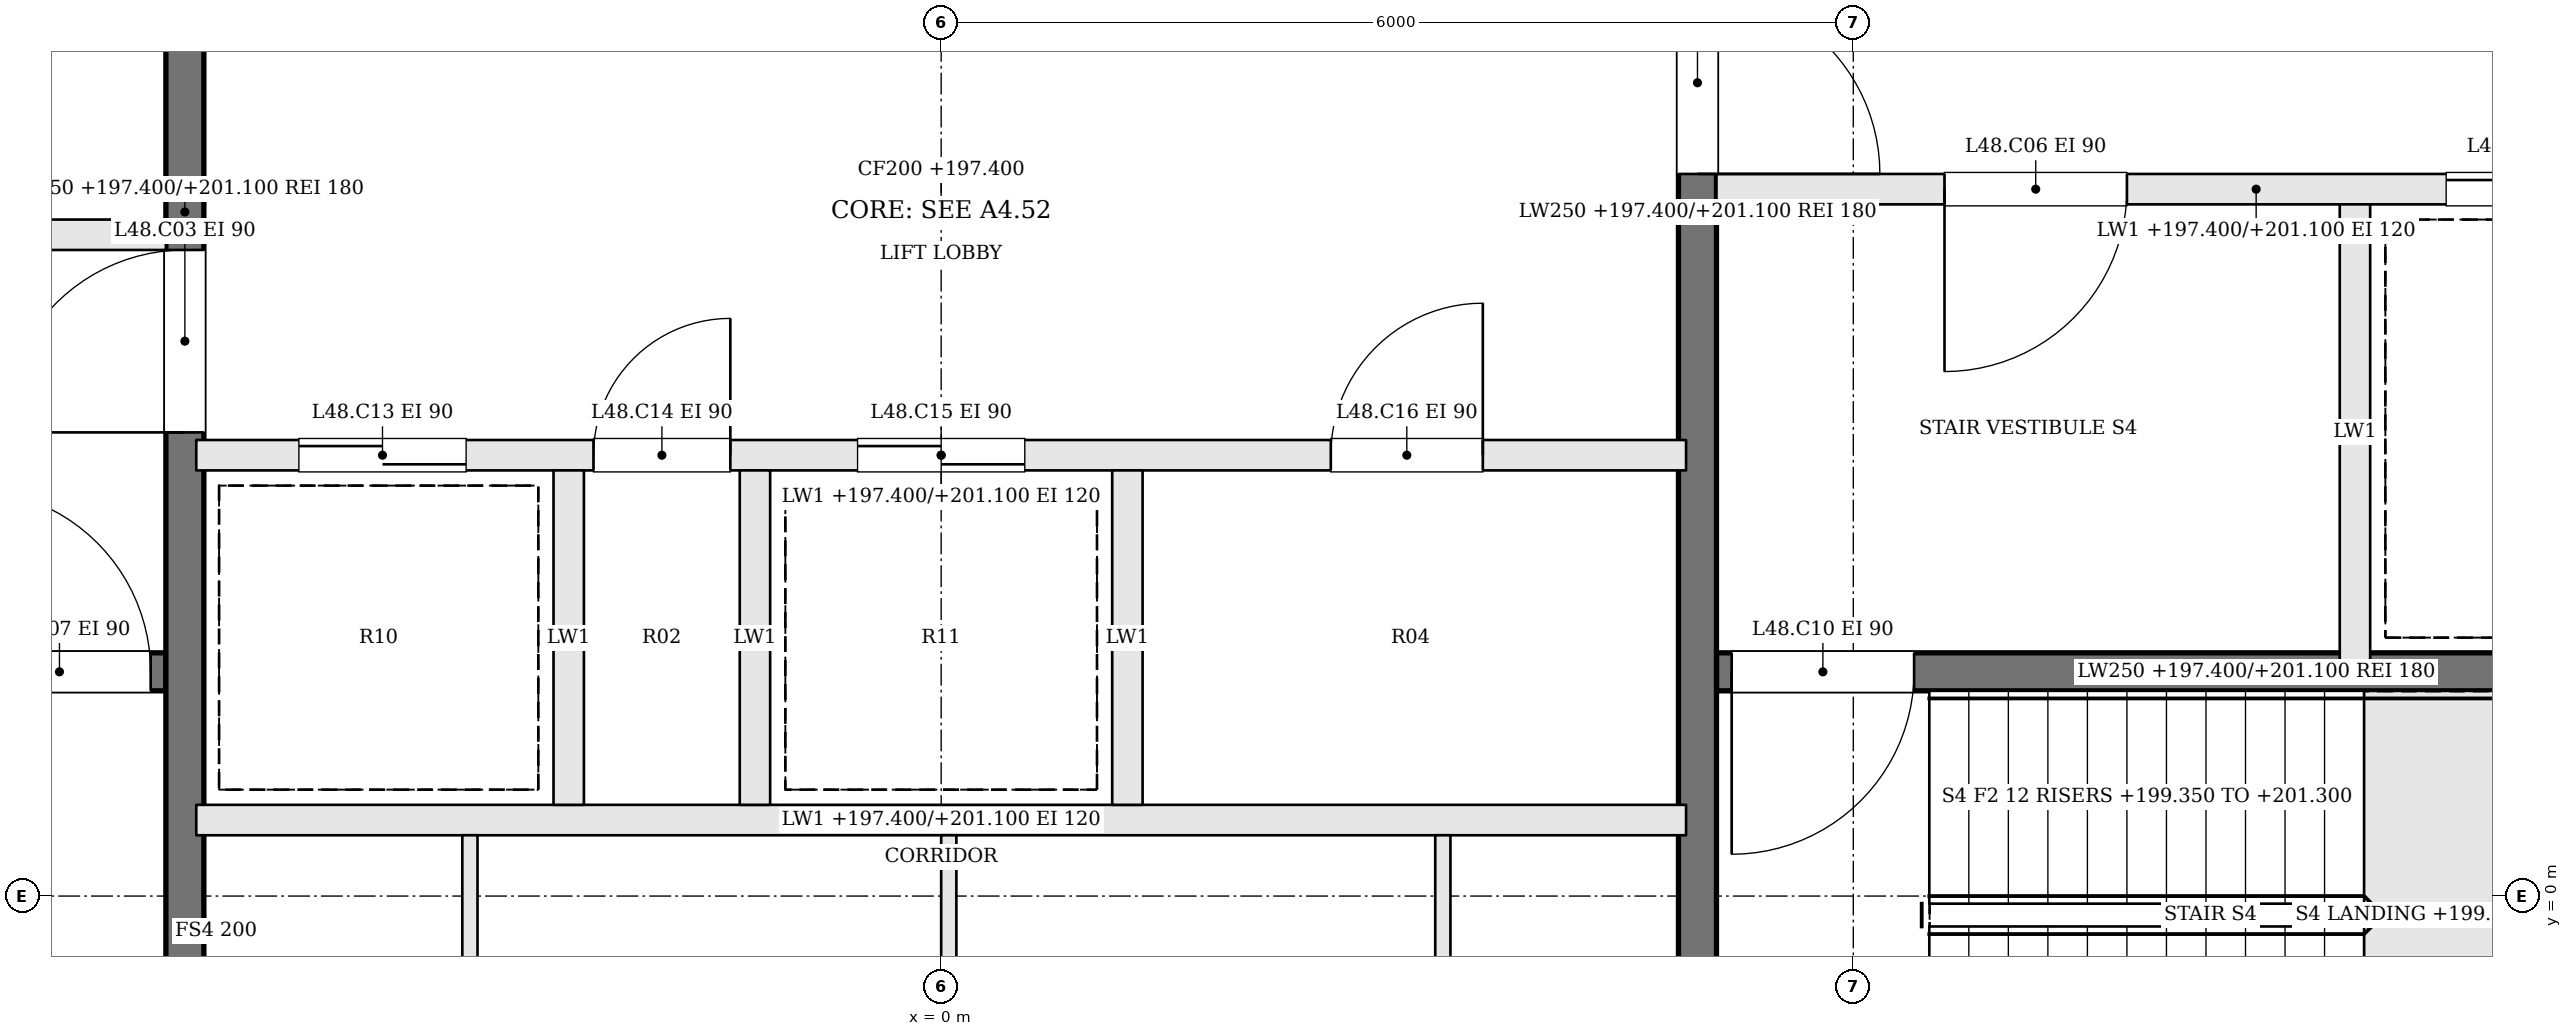
"""IFC4 building model, lengths in metres.
Left out: names, types, materials, properties, quantities, classifications, styles, units other than length and angle.
Written with IfcOpenShell. Run it as: python <this file> out.ifc"""

import sys

from ifc_helpers import new_model, si_unit, direction, frame, frame_2d, origin, place, context, subcontext, project, spatial, rectangle, extrude, element, fill, save


model = new_model("IFC4")
c1 = context("Model", 3, precision=1e-05, world=origin(), true_north=direction((0.0, 1.0)))
c2 = subcontext(c1, "Body", "Model", "MODEL_VIEW")
j1 = project(units=[si_unit("LENGTHUNIT", "METRE"), si_unit("PLANEANGLEUNIT", "RADIAN")], contexts=[c1])
p1 = place(None, origin())
s1 = spatial("IfcSite", under=j1, at=p1, CompositionType="ELEMENT")
p2 = place(p1, origin())
s2 = spatial("IfcBuilding", under=s1, at=p2, CompositionType="ELEMENT")
p3 = place(p2, frame((0.0, 0.0, 197.4)))
s3 = spatial("IfcBuildingStorey", under=s2, at=p3, CompositionType="ELEMENT", Elevation=197.4)
p4 = place(p3, frame((-12.2, 1.475, 0.0), z_axis=(0.0, 0.0, 1.0), x_axis=(1.0, 0.0, 0.0)))
e1 = element("IfcWall", 1, at=p4, inside=s3, PredefinedType="SOLIDWALL", context=c2, shape_type="SweptSolid", body=[
    extrude(rectangle(XDim=7.1, YDim=0.25, at=frame_2d((3.55, 0.0))), origin(), (0.0, 0.0, 1.0), 3.7),
])
p5 = place(p4, frame((5.8, 0.0, 0.0)))
e2 = element("IfcOpeningElement", 2, at=p5, cuts=e1, PredefinedType="OPENING", context=c2, shape_type="SweptSolid", body=[
    extrude(rectangle(XDim=1.2, YDim=2.1, at=frame_2d((0.6, 1.05))), frame((0.0, 0.135, 0.0), z_axis=(0.0, -1.0, 0.0), x_axis=(1.0, 0.0, 0.0)), (0.0, 0.0, 1.0), 0.27),
])
p6 = place(p3, frame((-12.2, 4.35, 0.0), z_axis=(0.0, 0.0, 1.0), x_axis=(1.0, 0.0, 0.0)))
e3 = element("IfcWall", 3, at=p6, inside=s3, PredefinedType="SOLIDWALL", context=c2, shape_type="SweptSolid", body=[
    extrude(rectangle(XDim=7.1, YDim=0.2, at=frame_2d((3.55, 0.0))), origin(), (0.0, 0.0, 1.0), 3.7),
])
p7 = place(p6, frame((4.4, 0.0, 0.0)))
e4 = element("IfcOpeningElement", 4, at=p7, cuts=e3, PredefinedType="OPENING", context=c2, shape_type="SweptSolid", body=[
    extrude(rectangle(XDim=1.2, YDim=2.1, at=frame_2d((0.6, 1.05))), frame((0.0, 0.11, 0.0), z_axis=(0.0, -1.0, 0.0), x_axis=(1.0, 0.0, 0.0)), (0.0, 0.0, 1.0), 0.22),
])
p8 = place(p6, frame((1.1, 0.0, 0.0)))
e5 = element("IfcOpeningElement", 5, at=p8, cuts=e3, PredefinedType="OPENING", context=c2, shape_type="SweptSolid", body=[
    extrude(rectangle(XDim=1.2, YDim=2.1, at=frame_2d((0.6, 1.05))), frame((0.0, 0.11, 0.0), z_axis=(0.0, -1.0, 0.0), x_axis=(1.0, 0.0, 0.0)), (0.0, 0.0, 1.0), 0.22),
])
p9 = place(p3, frame((12.2, 4.65, 0.0), z_axis=(0.0, 0.0, 1.0), x_axis=(-1.0, 0.0, 0.0)))
e6 = element("IfcWall", 6, at=p9, inside=s3, PredefinedType="SOLIDWALL", context=c2, shape_type="SweptSolid", body=[
    extrude(rectangle(XDim=7.1, YDim=0.2, at=frame_2d((3.55, 0.0))), origin(), (0.0, 0.0, 1.0), 3.7),
])
p10 = place(p9, frame((4.4, 0.0, 0.0)))
e7 = element("IfcOpeningElement", 7, at=p10, cuts=e6, PredefinedType="OPENING", context=c2, shape_type="SweptSolid", body=[
    extrude(rectangle(XDim=1.2, YDim=2.1, at=frame_2d((0.6, 1.05))), frame((0.0, 0.11, 0.0), z_axis=(0.0, -1.0, 0.0), x_axis=(1.0, 0.0, 0.0)), (0.0, 0.0, 1.0), 0.22),
])
p11 = place(p9, frame((1.1, 0.0, 0.0)))
e8 = element("IfcOpeningElement", 8, at=p11, cuts=e6, PredefinedType="OPENING", context=c2, shape_type="SweptSolid", body=[
    extrude(rectangle(XDim=1.2, YDim=2.1, at=frame_2d((0.6, 1.05))), frame((0.0, 0.11, 0.0), z_axis=(0.0, -1.0, 0.0), x_axis=(1.0, 0.0, 0.0)), (0.0, 0.0, 1.0), 0.22),
])
p12 = place(p3, frame((12.2, 1.475, 0.0), z_axis=(0.0, 0.0, 1.0), x_axis=(-1.0, 0.0, 0.0)))
e9 = element("IfcWall", 9, at=p12, inside=s3, PredefinedType="SOLIDWALL", context=c2, shape_type="SweptSolid", body=[
    extrude(rectangle(XDim=7.1, YDim=0.25, at=frame_2d((3.55, 0.0))), origin(), (0.0, 0.0, 1.0), 3.7),
])
p13 = place(p12, frame((5.8, 0.0, 0.0)))
e10 = element("IfcOpeningElement", 10, at=p13, cuts=e9, PredefinedType="OPENING", context=c2, shape_type="SweptSolid", body=[
    extrude(rectangle(XDim=1.2, YDim=2.1, at=frame_2d((0.6, 1.05))), frame((0.0, 0.135, 0.0), z_axis=(0.0, -1.0, 0.0), x_axis=(1.0, 0.0, 0.0)), (0.0, 0.0, 1.0), 0.27),
])
p14 = place(p3, frame((9.3, 4.55, 0.0), z_axis=(0.0, 0.0, 1.0), x_axis=(0.0, -1.0, 0.0)))
e11 = element("IfcWall", 11, at=p14, inside=s3, PredefinedType="SOLIDWALL", context=c2, shape_type="SweptSolid", body=[
    extrude(rectangle(XDim=3.0, YDim=0.2, at=frame_2d((1.5, 0.0))), origin(), (0.0, 0.0, 1.0), 3.7),
])
p15 = place(p3, frame((-4.975, -2.2, 0.0), z_axis=(0.0, 0.0, 1.0), x_axis=(0.0, 1.0, 0.0)))
e12 = element("IfcWall", 12, at=p15, inside=s3, PredefinedType="SOLIDWALL", context=c2, shape_type="SweptSolid", body=[
    extrude(rectangle(XDim=13.4, YDim=0.25, at=frame_2d((6.7, 0.0))), origin(), (0.0, 0.0, 1.0), 3.7),
])
p16 = place(p15, frame((5.25, 0.0, 0.0)))
e13 = element("IfcOpeningElement", 13, at=p16, cuts=e12, PredefinedType="OPENING", context=c2, shape_type="SweptSolid", body=[
    extrude(rectangle(XDim=1.2, YDim=2.1, at=frame_2d((0.6, 1.05))), frame((0.0, 0.135, 0.0), z_axis=(0.0, -1.0, 0.0), x_axis=(1.0, 0.0, 0.0)), (0.0, 0.0, 1.0), 0.27),
])
p17 = place(p3, frame((4.975, 11.2, 0.0), z_axis=(0.0, 0.0, 1.0), x_axis=(0.0, -1.0, 0.0)))
e14 = element("IfcWall", 14, at=p17, inside=s3, PredefinedType="SOLIDWALL", context=c2, shape_type="SweptSolid", body=[
    extrude(rectangle(XDim=13.4, YDim=0.25, at=frame_2d((6.7, 0.0))), origin(), (0.0, 0.0, 1.0), 3.7),
])
p18 = place(p17, frame((5.25, 0.0, 0.0)))
e15 = element("IfcOpeningElement", 15, at=p18, cuts=e14, PredefinedType="OPENING", context=c2, shape_type="SweptSolid", body=[
    extrude(rectangle(XDim=1.2, YDim=2.1, at=frame_2d((0.6, 1.05))), frame((0.0, 0.135, 0.0), z_axis=(0.0, -1.0, 0.0), x_axis=(1.0, 0.0, 0.0)), (0.0, 0.0, 1.0), 0.27),
])
p19 = place(p3, frame((-4.9, 0.5, 0.0), z_axis=(0.0, 0.0, 1.0), x_axis=(1.0, 0.0, 0.0)))
e16 = element("IfcWall", 16, at=p19, inside=s3, PredefinedType="SOLIDWALL", context=c2, shape_type="SweptSolid", body=[
    extrude(rectangle(XDim=9.8, YDim=0.2, at=frame_2d((4.9, 0.0))), origin(), (0.0, 0.0, 1.0), 3.7),
])
p20 = place(p3, frame((-4.9, 2.9, 0.0), z_axis=(0.0, 0.0, 1.0), x_axis=(1.0, 0.0, 0.0)))
e17 = element("IfcWall", 17, at=p20, inside=s3, PredefinedType="SOLIDWALL", context=c2, shape_type="SweptSolid", body=[
    extrude(rectangle(XDim=9.8, YDim=0.2, at=frame_2d((4.9, 0.0))), origin(), (0.0, 0.0, 1.0), 3.7),
])
p21 = place(p20, frame((0.675, 0.0, 0.0)))
e18 = element("IfcOpeningElement", 18, at=p21, cuts=e17, PredefinedType="OPENING", context=c2, shape_type="SweptSolid", body=[
    extrude(rectangle(XDim=1.1, YDim=2.1, at=frame_2d((0.55, 1.05))), frame((0.0, 0.11, 0.0), z_axis=(0.0, -1.0, 0.0), x_axis=(1.0, 0.0, 0.0)), (0.0, 0.0, 1.0), 0.22),
])
p22 = place(p20, frame((2.613, 0.0, 0.0)))
e19 = element("IfcOpeningElement", 19, at=p22, cuts=e17, PredefinedType="OPENING", context=c2, shape_type="SweptSolid", body=[
    extrude(rectangle(XDim=0.9, YDim=2.1, at=frame_2d((0.45, 1.05))), frame((0.0, 0.11, 0.0), z_axis=(0.0, -1.0, 0.0), x_axis=(1.0, 0.0, 0.0)), (0.0, 0.0, 1.0), 0.22),
])
p23 = place(p20, frame((4.35, 0.0, 0.0)))
e20 = element("IfcOpeningElement", 20, at=p23, cuts=e17, PredefinedType="OPENING", context=c2, shape_type="SweptSolid", body=[
    extrude(rectangle(XDim=1.1, YDim=2.1, at=frame_2d((0.55, 1.05))), frame((0.0, 0.11, 0.0), z_axis=(0.0, -1.0, 0.0), x_axis=(1.0, 0.0, 0.0)), (0.0, 0.0, 1.0), 0.22),
])
p24 = place(p20, frame((7.463, 0.0, 0.0)))
e21 = element("IfcOpeningElement", 21, at=p24, cuts=e17, PredefinedType="OPENING", context=c2, shape_type="SweptSolid", body=[
    extrude(rectangle(XDim=1.0, YDim=2.1, at=frame_2d((0.5, 1.05))), frame((0.0, 0.11, 0.0), z_axis=(0.0, -1.0, 0.0), x_axis=(1.0, 0.0, 0.0)), (0.0, 0.0, 1.0), 0.22),
])
for number, where, z_axis, x_axis in (
    (22, (-2.45, 0.6, 0.0), (0.0, 0.0, 1.0), (0.0, 1.0, 0.0)),
    (23, (-1.225, 0.6, 0.0), (0.0, 0.0, 1.0), (0.0, 1.0, 0.0)),
    (24, (1.225, 0.6, 0.0), (0.0, 0.0, 1.0), (0.0, 1.0, 0.0)),
):
    element("IfcWall", number, at=place(p3, frame(where, z_axis=z_axis, x_axis=x_axis)), inside=s3, PredefinedType="SOLIDWALL", context=c2, shape_type="SweptSolid", body=[
        extrude(rectangle(XDim=2.2, YDim=0.2, at=frame_2d((1.1, 0.0))), origin(), (0.0, 0.0, 1.0), 3.7),
    ])
for number, where, z_axis, x_axis in (
    (25, (-3.1, -2.2, 0.0), (0.0, 0.0, 1.0), (0.0, 1.0, 0.0)),
    (26, (0.05, -2.2, 0.0), (0.0, 0.0, 1.0), (0.0, 1.0, 0.0)),
    (27, (3.3, -2.2, 0.0), (0.0, 0.0, 1.0), (0.0, 1.0, 0.0)),
):
    element("IfcWall", number, at=place(p3, frame(where, z_axis=z_axis, x_axis=x_axis)), inside=s3, PredefinedType="PARTITIONING", context=c2, shape_type="SweptSolid", body=[
        extrude(rectangle(XDim=2.6, YDim=0.1, at=frame_2d((1.3, 0.0))), origin(), (0.0, 0.0, 1.0), 3.7),
    ])
p25 = place(p16, origin())
e28 = element("IfcDoor", 28, at=p25, inside=s3, OperationType="SINGLE_SWING_LEFT", PredefinedType="DOOR", context=c2, shape_type="SweptSolid", body=[
    extrude(rectangle(XDim=1.2, YDim=2.1, at=frame_2d((0.6, 1.05))), frame((0.0, 0.025, 0.0), z_axis=(0.0, -1.0, 0.0), x_axis=(1.0, 0.0, 0.0)), (0.0, 0.0, 1.0), 0.05),
])
fill(e13, e28)
p26 = place(p18, origin())
e29 = element("IfcDoor", 29, at=p26, inside=s3, OperationType="SINGLE_SWING_RIGHT", PredefinedType="DOOR", context=c2, shape_type="SweptSolid", body=[
    extrude(rectangle(XDim=1.2, YDim=2.1, at=frame_2d((0.6, 1.05))), frame((0.0, 0.025, 0.0), z_axis=(0.0, -1.0, 0.0), x_axis=(1.0, 0.0, 0.0)), (0.0, 0.0, 1.0), 0.05),
])
fill(e15, e29)
p27 = place(p10, origin())
e30 = element("IfcDoor", 30, at=p27, inside=s3, OperationType="SINGLE_SWING_RIGHT", PredefinedType="DOOR", context=c2, shape_type="SweptSolid", body=[
    extrude(rectangle(XDim=1.2, YDim=2.1, at=frame_2d((0.6, 1.05))), frame((0.0, 0.025, 0.0), z_axis=(0.0, -1.0, 0.0), x_axis=(1.0, 0.0, 0.0)), (0.0, 0.0, 1.0), 0.05),
])
fill(e7, e30)
p28 = place(p5, origin())
e31 = element("IfcDoor", 31, at=p28, inside=s3, OperationType="SINGLE_SWING_LEFT", PredefinedType="DOOR", context=c2, shape_type="SweptSolid", body=[
    extrude(rectangle(XDim=1.2, YDim=2.1, at=frame_2d((0.6, 1.05))), frame((0.0, 0.025, 0.0), z_axis=(0.0, -1.0, 0.0), x_axis=(1.0, 0.0, 0.0)), (0.0, 0.0, 1.0), 0.05),
])
fill(e2, e31)
p29 = place(p13, origin())
e32 = element("IfcDoor", 32, at=p29, inside=s3, OperationType="SINGLE_SWING_RIGHT", PredefinedType="DOOR", context=c2, shape_type="SweptSolid", body=[
    extrude(rectangle(XDim=1.2, YDim=2.1, at=frame_2d((0.6, 1.05))), frame((0.0, 0.025, 0.0), z_axis=(0.0, -1.0, 0.0), x_axis=(1.0, 0.0, 0.0)), (0.0, 0.0, 1.0), 0.05),
])
fill(e10, e32)
p30 = place(p11, origin())
e33 = element("IfcDoor", 33, at=p30, inside=s3, OperationType="SLIDING_TO_RIGHT", PredefinedType="DOOR", context=c2, shape_type="SweptSolid", body=[
    extrude(rectangle(XDim=1.2, YDim=2.1, at=frame_2d((0.6, 1.05))), frame((0.0, 0.025, 0.0), z_axis=(0.0, -1.0, 0.0), x_axis=(1.0, 0.0, 0.0)), (0.0, 0.0, 1.0), 0.05),
])
fill(e8, e33)
p31 = place(p21, origin())
e34 = element("IfcDoor", 34, at=p31, inside=s3, OperationType="SLIDING_TO_RIGHT", PredefinedType="DOOR", context=c2, shape_type="SweptSolid", body=[
    extrude(rectangle(XDim=1.1, YDim=2.1, at=frame_2d((0.55, 1.05))), frame((0.0, 0.025, 0.0), z_axis=(0.0, -1.0, 0.0), x_axis=(1.0, 0.0, 0.0)), (0.0, 0.0, 1.0), 0.05),
])
fill(e18, e34)
p32 = place(p22, origin())
e35 = element("IfcDoor", 35, at=p32, inside=s3, OperationType="SINGLE_SWING_RIGHT", PredefinedType="DOOR", context=c2, shape_type="SweptSolid", body=[
    extrude(rectangle(XDim=0.9, YDim=2.1, at=frame_2d((0.45, 1.05))), frame((0.0, 0.025, 0.0), z_axis=(0.0, -1.0, 0.0), x_axis=(1.0, 0.0, 0.0)), (0.0, 0.0, 1.0), 0.05),
])
fill(e19, e35)
p33 = place(p23, origin())
e36 = element("IfcDoor", 36, at=p33, inside=s3, OperationType="SLIDING_TO_LEFT", PredefinedType="DOOR", context=c2, shape_type="SweptSolid", body=[
    extrude(rectangle(XDim=1.1, YDim=2.1, at=frame_2d((0.55, 1.05))), frame((0.0, 0.025, 0.0), z_axis=(0.0, -1.0, 0.0), x_axis=(1.0, 0.0, 0.0)), (0.0, 0.0, 1.0), 0.05),
])
fill(e20, e36)
p34 = place(p24, origin())
e37 = element("IfcDoor", 37, at=p34, inside=s3, OperationType="SINGLE_SWING_RIGHT", PredefinedType="DOOR", context=c2, shape_type="SweptSolid", body=[
    extrude(rectangle(XDim=1.0, YDim=2.1, at=frame_2d((0.5, 1.05))), frame((0.0, 0.025, 0.0), z_axis=(0.0, -1.0, 0.0), x_axis=(1.0, 0.0, 0.0)), (0.0, 0.0, 1.0), 0.05),
])
fill(e21, e37)
save(model, sys.argv[1])
